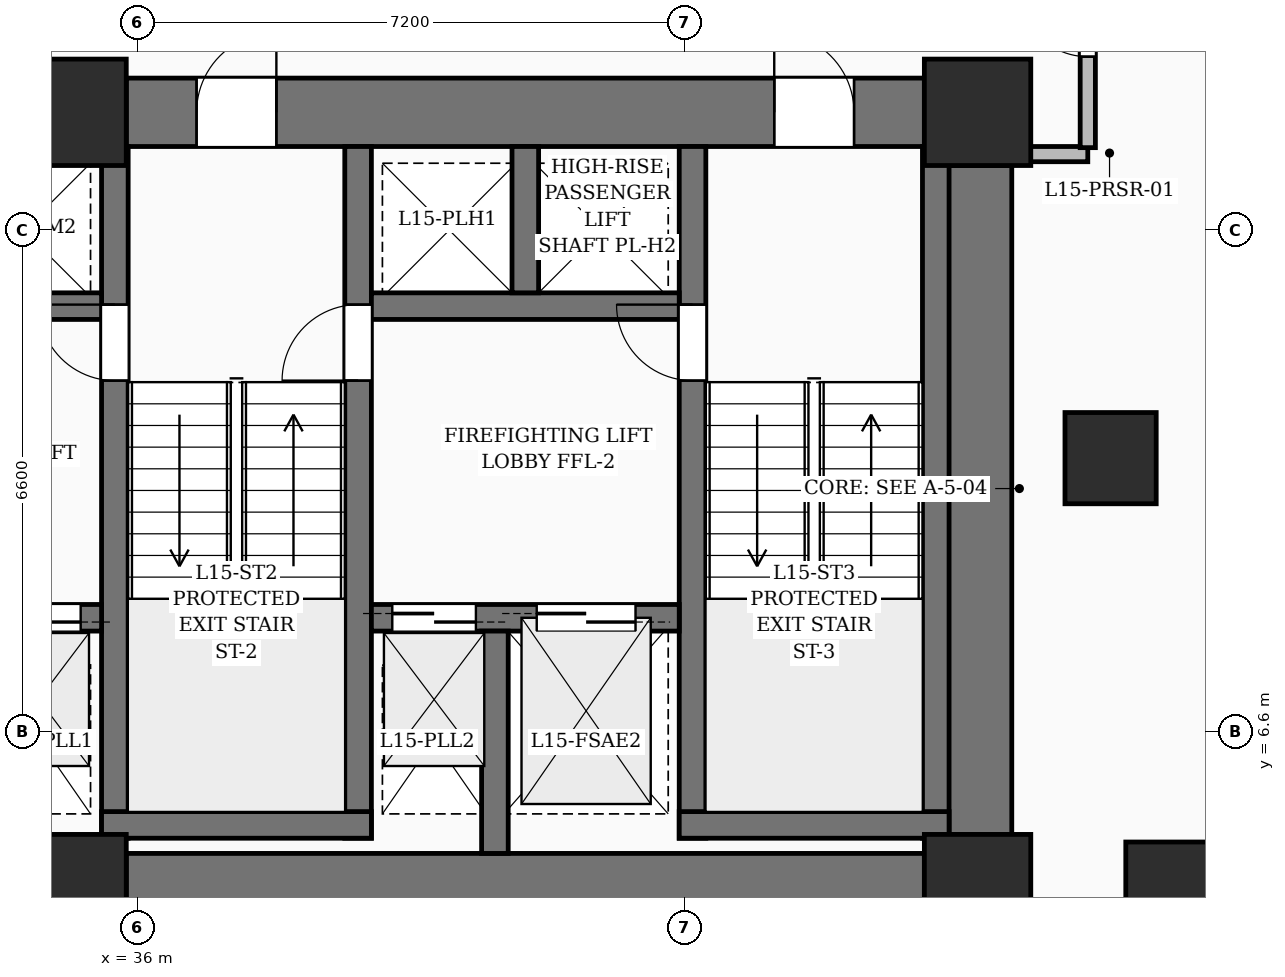
"""IFC4 building model, lengths in metres.
Left out: names, types, materials, properties, quantities, classifications, styles, units other than length and angle.
Written with IfcOpenShell. Run it as: python <this file> out.ifc"""

import sys

from ifc_helpers import new_model, si_unit, direction, frame, frame_2d, origin, origin_2d, place, context, subcontext, project, spatial, rectangle, extrude, element, fill, save


model = new_model("IFC4")
c1 = context("Model", 3, precision=1e-05, world=origin(), true_north=direction((0.0, 1.0)))
c2 = subcontext(c1, "Body", "Model", "MODEL_VIEW")
j1 = project(units=[si_unit("LENGTHUNIT", "METRE"), si_unit("PLANEANGLEUNIT", "RADIAN")], contexts=[c1])
p1 = place(None, origin())
s1 = spatial("IfcSite", under=j1, at=p1, CompositionType="ELEMENT")
p2 = place(p1, origin())
s2 = spatial("IfcBuilding", under=s1, at=p2, CompositionType="ELEMENT")
p3 = place(p2, frame((0.0, 0.0, 64.2)))
s3 = spatial("IfcBuildingStorey", under=s2, at=p3, CompositionType="ELEMENT", Elevation=64.2)
for number, where, z_axis, x_axis in (
    (1, (35.15, 4.55, 0.0), (0.0, 0.0, 1.0), (1.0, 0.0, 0.0)),
    (2, (47.05, 4.55, 0.0), (0.0, 0.0, 1.0), (1.0, 0.0, 0.0)),
    (3, (35.15, 14.75, 0.0), (0.0, 0.0, 1.0), (1.0, 0.0, 0.0)),
    (4, (47.05, 14.75, 0.0), (0.0, 0.0, 1.0), (1.0, 0.0, 0.0)),
):
    element("IfcColumn", number, at=place(p3, frame(where, z_axis=z_axis, x_axis=x_axis)), inside=s3, PredefinedType="COLUMN", context=c2, shape_type="SweptSolid", body=[
        extrude(rectangle(XDim=1.4, YDim=1.4, at=origin_2d()), origin(), (0.0, 0.0, 1.0), 3.6),
    ])
for number, where, z_axis, x_axis in (
    (5, (49.6, 4.55, 0.0), (0.0, 0.0, 1.0), (1.0, 0.0, 0.0)),
    (6, (48.8, 10.2, 0.0), (0.0, 0.0, 1.0), (1.0, 0.0, 0.0)),
):
    element("IfcColumn", number, at=place(p3, frame(where, z_axis=z_axis, x_axis=x_axis)), inside=s3, PredefinedType="COLUMN", context=c2, shape_type="SweptSolid", body=[
        extrude(rectangle(XDim=1.2, YDim=1.2, at=origin_2d()), origin(), (0.0, 0.0, 1.0), 3.6),
    ])
p4 = place(p3, frame((35.85, 4.55, 0.0), z_axis=(0.0, 0.0, 1.0), x_axis=(1.0, 0.0, 0.0)))
e7 = element("IfcWall", 7, at=p4, inside=s3, PredefinedType="SHEAR", context=c2, shape_type="SweptSolid", body=[
    extrude(rectangle(XDim=10.5, YDim=0.9, at=frame_2d((5.25, 0.0))), origin(), (0.0, 0.0, 1.0), 3.6),
])
p5 = place(p3, frame((35.85, 14.75, 0.0), z_axis=(0.0, 0.0, 1.0), x_axis=(1.0, 0.0, 0.0)))
e8 = element("IfcWall", 8, at=p5, inside=s3, PredefinedType="SHEAR", context=c2, shape_type="SweptSolid", body=[
    extrude(rectangle(XDim=10.5, YDim=0.9, at=frame_2d((5.25, 0.0))), origin(), (0.0, 0.0, 1.0), 3.6),
])
p6 = place(p5, frame((0.925, 0.0, 0.0)))
e9 = element("IfcOpeningElement", 9, at=p6, cuts=e8, PredefinedType="OPENING", context=c2, shape_type="SweptSolid", body=[
    extrude(rectangle(XDim=1.05, YDim=2.15, at=frame_2d((0.525, 1.075))), frame((0.0, 0.46, 0.0), z_axis=(0.0, -1.0, 0.0), x_axis=(1.0, 0.0, 0.0)), (0.0, 0.0, 1.0), 0.92),
])
p7 = place(p5, frame((8.525, 0.0, 0.0)))
e10 = element("IfcOpeningElement", 10, at=p7, cuts=e8, PredefinedType="OPENING", context=c2, shape_type="SweptSolid", body=[
    extrude(rectangle(XDim=1.05, YDim=2.15, at=frame_2d((0.525, 1.075))), frame((0.0, 0.46, 0.0), z_axis=(0.0, -1.0, 0.0), x_axis=(1.0, 0.0, 0.0)), (0.0, 0.0, 1.0), 0.92),
])
p8 = place(p3, frame((47.05, 5.25, 0.0), z_axis=(0.0, 0.0, 1.0), x_axis=(0.0, 1.0, 0.0)))
e11 = element("IfcWall", 11, at=p8, inside=s3, PredefinedType="SHEAR", context=c2, shape_type="SweptSolid", body=[
    extrude(rectangle(XDim=8.8, YDim=0.9, at=frame_2d((4.4, 0.0))), origin(), (0.0, 0.0, 1.0), 3.6),
])
p9 = place(p3, frame((35.7, 5.2, 0.0), z_axis=(0.0, 0.0, 1.0), x_axis=(0.0, 1.0, 0.0)))
e12 = element("IfcWall", 12, at=p9, inside=s3, PredefinedType="SOLIDWALL", context=c2, shape_type="SweptSolid", body=[
    extrude(rectangle(XDim=9.1, YDim=0.35, at=frame_2d((4.55, 0.0))), origin(), (0.0, 0.0, 1.0), 3.6),
])
p10 = place(p9, frame((6.02, 0.0, 0.0)))
e13 = element("IfcOpeningElement", 13, at=p10, cuts=e12, PredefinedType="OPENING", context=c2, shape_type="SweptSolid", body=[
    extrude(rectangle(XDim=1.0, YDim=2.15, at=frame_2d((0.5, 1.075))), frame((0.0, 0.185, 0.0), z_axis=(0.0, -1.0, 0.0), x_axis=(1.0, 0.0, 0.0)), (0.0, 0.0, 1.0), 0.37),
])
p11 = place(p3, frame((38.9, 5.2, 0.0), z_axis=(0.0, 0.0, 1.0), x_axis=(0.0, 1.0, 0.0)))
e14 = element("IfcWall", 14, at=p11, inside=s3, PredefinedType="SOLIDWALL", context=c2, shape_type="SweptSolid", body=[
    extrude(rectangle(XDim=9.1, YDim=0.35, at=frame_2d((4.55, 0.0))), origin(), (0.0, 0.0, 1.0), 3.6),
])
p12 = place(p11, frame((6.02, 0.0, 0.0)))
e15 = element("IfcOpeningElement", 15, at=p12, cuts=e14, PredefinedType="OPENING", context=c2, shape_type="SweptSolid", body=[
    extrude(rectangle(XDim=1.0, YDim=2.15, at=frame_2d((0.5, 1.075))), frame((0.0, 0.185, 0.0), z_axis=(0.0, -1.0, 0.0), x_axis=(1.0, 0.0, 0.0)), (0.0, 0.0, 1.0), 0.37),
])
p13 = place(p3, frame((35.525, 5.375, 0.0), z_axis=(0.0, 0.0, 1.0), x_axis=(1.0, 0.0, 0.0)))
e16 = element("IfcWall", 16, at=p13, inside=s3, PredefinedType="SOLIDWALL", context=c2, shape_type="SweptSolid", body=[
    extrude(rectangle(XDim=3.55, YDim=0.35, at=frame_2d((1.775, 0.0))), origin(), (0.0, 0.0, 1.0), 3.6),
])
p14 = place(p3, frame((43.3, 5.2, 0.0), z_axis=(0.0, 0.0, 1.0), x_axis=(0.0, 1.0, 0.0)))
e17 = element("IfcWall", 17, at=p14, inside=s3, PredefinedType="SOLIDWALL", context=c2, shape_type="SweptSolid", body=[
    extrude(rectangle(XDim=9.1, YDim=0.35, at=frame_2d((4.55, 0.0))), origin(), (0.0, 0.0, 1.0), 3.6),
])
p15 = place(p14, frame((6.02, 0.0, 0.0)))
e18 = element("IfcOpeningElement", 18, at=p15, cuts=e17, PredefinedType="OPENING", context=c2, shape_type="SweptSolid", body=[
    extrude(rectangle(XDim=1.0, YDim=2.15, at=frame_2d((0.5, 1.075))), frame((0.0, 0.185, 0.0), z_axis=(0.0, -1.0, 0.0), x_axis=(1.0, 0.0, 0.0)), (0.0, 0.0, 1.0), 0.37),
])
p16 = place(p3, frame((46.5, 5.2, 0.0), z_axis=(0.0, 0.0, 1.0), x_axis=(0.0, 1.0, 0.0)))
e19 = element("IfcWall", 19, at=p16, inside=s3, PredefinedType="SOLIDWALL", context=c2, shape_type="SweptSolid", body=[
    extrude(rectangle(XDim=9.1, YDim=0.35, at=frame_2d((4.55, 0.0))), origin(), (0.0, 0.0, 1.0), 3.6),
])
p17 = place(p3, frame((43.125, 5.375, 0.0), z_axis=(0.0, 0.0, 1.0), x_axis=(1.0, 0.0, 0.0)))
e20 = element("IfcWall", 20, at=p17, inside=s3, PredefinedType="SOLIDWALL", context=c2, shape_type="SweptSolid", body=[
    extrude(rectangle(XDim=3.55, YDim=0.35, at=frame_2d((1.775, 0.0))), origin(), (0.0, 0.0, 1.0), 3.6),
])
p18 = place(p3, frame((31.475, 8.1, 0.0), z_axis=(0.0, 0.0, 1.0), x_axis=(1.0, 0.0, 0.0)))
e21 = element("IfcWall", 21, at=p18, inside=s3, PredefinedType="SOLIDWALL", context=c2, shape_type="SweptSolid", body=[
    extrude(rectangle(XDim=4.05, YDim=0.35, at=frame_2d((2.025, 0.0))), origin(), (0.0, 0.0, 1.0), 3.6),
])
p19 = place(p18, frame((0.575, 0.0, 0.0)))
e22 = element("IfcOpeningElement", 22, at=p19, cuts=e21, PredefinedType="OPENING", context=c2, shape_type="SweptSolid", body=[
    extrude(rectangle(XDim=1.3, YDim=2.25, at=frame_2d((0.65, 1.125))), frame((0.0, 0.185, 0.0), z_axis=(0.0, -1.0, 0.0), x_axis=(1.0, 0.0, 0.0)), (0.0, 0.0, 1.0), 0.37),
])
p20 = place(p18, frame((2.675, 0.0, 0.0)))
e23 = element("IfcOpeningElement", 23, at=p20, cuts=e21, PredefinedType="OPENING", context=c2, shape_type="SweptSolid", body=[
    extrude(rectangle(XDim=1.1, YDim=2.2, at=frame_2d((0.55, 1.1))), frame((0.0, 0.185, 0.0), z_axis=(0.0, -1.0, 0.0), x_axis=(1.0, 0.0, 0.0)), (0.0, 0.0, 1.0), 0.37),
])
p21 = place(p3, frame((39.075, 8.1, 0.0), z_axis=(0.0, 0.0, 1.0), x_axis=(1.0, 0.0, 0.0)))
e24 = element("IfcWall", 24, at=p21, inside=s3, PredefinedType="SOLIDWALL", context=c2, shape_type="SweptSolid", body=[
    extrude(rectangle(XDim=4.05, YDim=0.35, at=frame_2d((2.025, 0.0))), origin(), (0.0, 0.0, 1.0), 3.6),
])
p22 = place(p21, frame((2.175, 0.0, 0.0)))
e25 = element("IfcOpeningElement", 25, at=p22, cuts=e24, PredefinedType="OPENING", context=c2, shape_type="SweptSolid", body=[
    extrude(rectangle(XDim=1.3, YDim=2.25, at=frame_2d((0.65, 1.125))), frame((0.0, 0.185, 0.0), z_axis=(0.0, -1.0, 0.0), x_axis=(1.0, 0.0, 0.0)), (0.0, 0.0, 1.0), 0.37),
])
p23 = place(p21, frame((0.275, 0.0, 0.0)))
e26 = element("IfcOpeningElement", 26, at=p23, cuts=e24, PredefinedType="OPENING", context=c2, shape_type="SweptSolid", body=[
    extrude(rectangle(XDim=1.1, YDim=2.2, at=frame_2d((0.55, 1.1))), frame((0.0, 0.185, 0.0), z_axis=(0.0, -1.0, 0.0), x_axis=(1.0, 0.0, 0.0)), (0.0, 0.0, 1.0), 0.37),
])
p24 = place(p3, frame((40.7, 5.0, 0.0), z_axis=(0.0, 0.0, 1.0), x_axis=(0.0, 1.0, 0.0)))
e27 = element("IfcWall", 27, at=p24, inside=s3, PredefinedType="SOLIDWALL", context=c2, shape_type="SweptSolid", body=[
    extrude(rectangle(XDim=2.925, YDim=0.35, at=frame_2d((1.462, 0.0))), origin(), (0.0, 0.0, 1.0), 3.6),
])
p25 = place(p3, frame((31.475, 12.2, 0.0), z_axis=(0.0, 0.0, 1.0), x_axis=(1.0, 0.0, 0.0)))
e28 = element("IfcWall", 28, at=p25, inside=s3, PredefinedType="SOLIDWALL", context=c2, shape_type="SweptSolid", body=[
    extrude(rectangle(XDim=4.05, YDim=0.35, at=frame_2d((2.025, 0.0))), origin(), (0.0, 0.0, 1.0), 3.6),
])
p26 = place(p3, frame((39.075, 12.2, 0.0), z_axis=(0.0, 0.0, 1.0), x_axis=(1.0, 0.0, 0.0)))
e29 = element("IfcWall", 29, at=p26, inside=s3, PredefinedType="SOLIDWALL", context=c2, shape_type="SweptSolid", body=[
    extrude(rectangle(XDim=4.05, YDim=0.35, at=frame_2d((2.025, 0.0))), origin(), (0.0, 0.0, 1.0), 3.6),
])
p27 = place(p3, frame((41.1, 12.375, 0.0), z_axis=(0.0, 0.0, 1.0), x_axis=(0.0, 1.0, 0.0)))
e30 = element("IfcWall", 30, at=p27, inside=s3, PredefinedType="SOLIDWALL", context=c2, shape_type="SweptSolid", body=[
    extrude(rectangle(XDim=1.925, YDim=0.35, at=frame_2d((0.962, 0.0))), origin(), (0.0, 0.0, 1.0), 3.6),
])
p28 = place(p3, frame((47.5, 14.2, 0.0), z_axis=(0.0, 0.0, 1.0), x_axis=(1.0, 0.0, 0.0)))
e31 = element("IfcWall", 31, at=p28, inside=s3, PredefinedType="PARTITIONING", context=c2, shape_type="SweptSolid", body=[
    extrude(rectangle(XDim=1.0, YDim=0.2, at=frame_2d((0.5, 0.0))), origin(), (0.0, 0.0, 1.0), 3.35),
])
p29 = place(p3, frame((48.5, 14.285, 0.0), z_axis=(0.0, 0.0, 1.0), x_axis=(0.0, 1.0, 0.0)))
e32 = element("IfcWall", 32, at=p29, inside=s3, PredefinedType="PARTITIONING", context=c2, shape_type="SweptSolid", body=[
    extrude(rectangle(XDim=2.465, YDim=0.2, at=frame_2d((1.232, 0.0))), origin(), (0.0, 0.0, 1.0), 2.279),
])
p30 = place(p29, frame((1.197, 0.0, 0.0)))
e33 = element("IfcOpeningElement", 33, at=p30, cuts=e32, PredefinedType="OPENING", context=c2, shape_type="SweptSolid", body=[
    extrude(rectangle(XDim=0.9, YDim=2.1, at=frame_2d((0.45, 1.05))), frame((0.0, 0.11, 0.0), z_axis=(0.0, -1.0, 0.0), x_axis=(1.0, 0.0, 0.0)), (0.0, 0.0, 1.0), 0.22),
])
p31 = place(p6, origin())
e34 = element("IfcDoor", 34, at=p31, inside=s3, OperationType="SINGLE_SWING_RIGHT", PredefinedType="DOOR", context=c2, shape_type="SweptSolid", body=[
    extrude(rectangle(XDim=1.05, YDim=2.15, at=frame_2d((0.525, 1.075))), frame((0.0, 0.025, 0.0), z_axis=(0.0, -1.0, 0.0), x_axis=(1.0, 0.0, 0.0)), (0.0, 0.0, 1.0), 0.05),
])
fill(e9, e34)
p32 = place(p7, origin())
e35 = element("IfcDoor", 35, at=p32, inside=s3, OperationType="SINGLE_SWING_LEFT", PredefinedType="DOOR", context=c2, shape_type="SweptSolid", body=[
    extrude(rectangle(XDim=1.05, YDim=2.15, at=frame_2d((0.525, 1.075))), frame((0.0, 0.025, 0.0), z_axis=(0.0, -1.0, 0.0), x_axis=(1.0, 0.0, 0.0)), (0.0, 0.0, 1.0), 0.05),
])
fill(e10, e35)
p33 = place(p10, origin())
e36 = element("IfcDoor", 36, at=p33, inside=s3, OperationType="SINGLE_SWING_RIGHT", PredefinedType="DOOR", context=c2, shape_type="SweptSolid", body=[
    extrude(rectangle(XDim=1.0, YDim=2.15, at=frame_2d((0.5, 1.075))), frame((0.0, 0.025, 0.0), z_axis=(0.0, -1.0, 0.0), x_axis=(1.0, 0.0, 0.0)), (0.0, 0.0, 1.0), 0.05),
])
fill(e13, e36)
p34 = place(p12, origin())
e37 = element("IfcDoor", 37, at=p34, inside=s3, OperationType="SINGLE_SWING_LEFT", PredefinedType="DOOR", context=c2, shape_type="SweptSolid", body=[
    extrude(rectangle(XDim=1.0, YDim=2.15, at=frame_2d((0.5, 1.075))), frame((0.0, 0.025, 0.0), z_axis=(0.0, -1.0, 0.0), x_axis=(1.0, 0.0, 0.0)), (0.0, 0.0, 1.0), 0.05),
])
fill(e15, e37)
p35 = place(p15, origin())
e38 = element("IfcDoor", 38, at=p35, inside=s3, OperationType="SINGLE_SWING_RIGHT", PredefinedType="DOOR", context=c2, shape_type="SweptSolid", body=[
    extrude(rectangle(XDim=1.0, YDim=2.15, at=frame_2d((0.5, 1.075))), frame((0.0, 0.025, 0.0), z_axis=(0.0, -1.0, 0.0), x_axis=(1.0, 0.0, 0.0)), (0.0, 0.0, 1.0), 0.05),
])
fill(e18, e38)
p36 = place(p22, origin())
e39 = element("IfcDoor", 39, at=p36, inside=s3, OperationType="DOUBLE_DOOR_SLIDING", PredefinedType="DOOR", context=c2, shape_type="SweptSolid", body=[
    extrude(rectangle(XDim=1.3, YDim=2.25, at=frame_2d((0.65, 1.125))), frame((0.0, 0.025, 0.0), z_axis=(0.0, -1.0, 0.0), x_axis=(1.0, 0.0, 0.0)), (0.0, 0.0, 1.0), 0.05),
])
fill(e25, e39)
p37 = place(p20, origin())
e40 = element("IfcDoor", 40, at=p37, inside=s3, OperationType="DOUBLE_DOOR_SLIDING", PredefinedType="DOOR", context=c2, shape_type="SweptSolid", body=[
    extrude(rectangle(XDim=1.1, YDim=2.2, at=frame_2d((0.55, 1.1))), frame((0.0, 0.025, 0.0), z_axis=(0.0, -1.0, 0.0), x_axis=(1.0, 0.0, 0.0)), (0.0, 0.0, 1.0), 0.05),
])
fill(e23, e40)
p38 = place(p23, origin())
e41 = element("IfcDoor", 41, at=p38, inside=s3, OperationType="DOUBLE_DOOR_SLIDING", PredefinedType="DOOR", context=c2, shape_type="SweptSolid", body=[
    extrude(rectangle(XDim=1.1, YDim=2.2, at=frame_2d((0.55, 1.1))), frame((0.0, 0.025, 0.0), z_axis=(0.0, -1.0, 0.0), x_axis=(1.0, 0.0, 0.0)), (0.0, 0.0, 1.0), 0.05),
])
fill(e26, e41)
p39 = place(p30, origin())
e42 = element("IfcDoor", 42, at=p39, inside=s3, OperationType="SINGLE_SWING_RIGHT", PredefinedType="DOOR", context=c2, shape_type="SweptSolid", body=[
    extrude(rectangle(XDim=0.9, YDim=2.1, at=frame_2d((0.45, 1.05))), frame((0.0, 0.025, 0.0), z_axis=(0.0, -1.0, 0.0), x_axis=(1.0, 0.0, 0.0)), (0.0, 0.0, 1.0), 0.05),
])
fill(e33, e42)
save(model, sys.argv[1])
